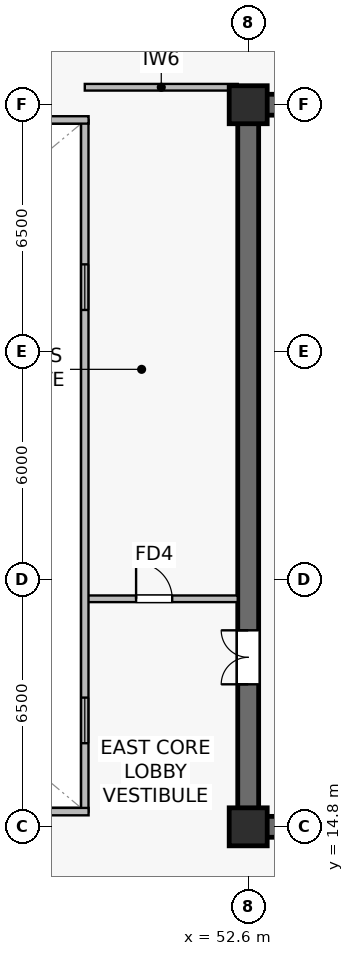
"""IFC4 building model, lengths in metres.
Left out: names, types, materials, properties, quantities, classifications, styles, units other than length and angle.
Written with IfcOpenShell. Run it as: python <this file> out.ifc"""

import sys

from ifc_helpers import new_model, si_unit, direction, frame, frame_2d, origin, origin_2d, place, context, subcontext, project, spatial, rectangle, extrude, source, transform, mapped, element, fill, save


model = new_model("IFC4")
c1 = context("Model", 3, precision=1e-05, world=origin(), true_north=direction((0.0, 1.0)))
c2 = subcontext(c1, "Body", "Model", "MODEL_VIEW")
j1 = project(units=[si_unit("LENGTHUNIT", "METRE"), si_unit("PLANEANGLEUNIT", "RADIAN")], contexts=[c1])
p1 = place(None, origin())
s1 = spatial("IfcSite", under=j1, at=p1, CompositionType="ELEMENT")
p2 = place(p1, origin())
s2 = spatial("IfcBuilding", under=s1, at=p2, CompositionType="ELEMENT")
p3 = place(p2, frame((0.0, 0.0, 238.3)))
s3 = spatial("IfcBuildingStorey", under=s2, at=p3, CompositionType="ELEMENT", Elevation=238.3)
p4 = place(p3, frame((52.325, 14.8, 0.0), z_axis=(0.0, 0.0, 1.0), x_axis=(1.0, 0.0, 0.0)))
e1 = element("IfcWall", 1, at=p4, inside=s3, PredefinedType="SHEAR", context=c2, shape_type="SweptSolid", body=[
    extrude(rectangle(XDim=15.35, YDim=0.55, at=frame_2d((7.675, 0.0))), origin(), (0.0, 0.0, 1.0), 3.8),
])
p5 = place(p3, frame((52.325, 33.8, 0.0), z_axis=(0.0, 0.0, 1.0), x_axis=(1.0, 0.0, 0.0)))
e2 = element("IfcWall", 2, at=p5, inside=s3, PredefinedType="SHEAR", context=c2, shape_type="SweptSolid", body=[
    extrude(rectangle(XDim=15.35, YDim=0.55, at=frame_2d((7.675, 0.0))), origin(), (0.0, 0.0, 1.0), 3.8),
])
p6 = place(p5, frame((8.775, 0.0, 0.0)))
e3 = element("IfcOpeningElement", 3, at=p6, cuts=e2, PredefinedType="OPENING", context=c2, shape_type="SweptSolid", body=[
    extrude(rectangle(XDim=0.95, YDim=2.15, at=frame_2d((0.475, 1.075))), frame((0.0, 0.285, 0.0), z_axis=(0.0, -1.0, 0.0), x_axis=(1.0, 0.0, 0.0)), (0.0, 0.0, 1.0), 0.57),
])
p7 = place(p5, frame((5.41, 0.0, 0.0)))
e4 = element("IfcOpeningElement", 4, at=p7, cuts=e2, PredefinedType="OPENING", context=c2, shape_type="SweptSolid", body=[
    extrude(rectangle(XDim=0.95, YDim=2.15, at=frame_2d((0.475, 1.075))), frame((0.0, 0.285, 0.0), z_axis=(0.0, -1.0, 0.0), x_axis=(1.0, 0.0, 0.0)), (0.0, 0.0, 1.0), 0.57),
])
p8 = place(p5, frame((2.01, 0.0, 0.0)))
e5 = element("IfcOpeningElement", 5, at=p8, cuts=e2, PredefinedType="OPENING", context=c2, shape_type="SweptSolid", body=[
    extrude(rectangle(XDim=0.95, YDim=2.15, at=frame_2d((0.475, 1.075))), frame((0.0, 0.285, 0.0), z_axis=(0.0, -1.0, 0.0), x_axis=(1.0, 0.0, 0.0)), (0.0, 0.0, 1.0), 0.57),
])
p9 = place(p3, frame((52.6, 15.075, 0.0), z_axis=(0.0, 0.0, 1.0), x_axis=(0.0, 1.0, 0.0)))
e6 = element("IfcWall", 6, at=p9, inside=s3, PredefinedType="SHEAR", context=c2, shape_type="SweptSolid", body=[
    extrude(rectangle(XDim=18.45, YDim=0.55, at=frame_2d((9.225, 0.0))), origin(), (0.0, 0.0, 1.0), 3.8),
])
p10 = place(p9, frame((3.475, 0.0, 0.0)))
e7 = element("IfcOpeningElement", 7, at=p10, cuts=e6, PredefinedType="OPENING", context=c2, shape_type="SweptSolid", body=[
    extrude(rectangle(XDim=1.42, YDim=2.2, at=frame_2d((0.71, 1.1))), frame((0.0, 0.285, 0.0), z_axis=(0.0, -1.0, 0.0), x_axis=(1.0, 0.0, 0.0)), (0.0, 0.0, 1.0), 0.57),
])
m1 = source(origin(), c2, "Body", "SweptSolid", [
    extrude(rectangle(XDim=1.0, YDim=1.0, at=origin_2d()), origin(), (0.0, 0.0, 1.0), 4.1),
])
for number, where, z_axis, x_axis in (
    (8, (52.6, 14.8, 0.0), (0.0, 0.0, 1.0), (1.0, 0.0, 0.0)),
    (9, (52.6, 33.8, 0.0), (0.0, 0.0, 1.0), (1.0, 0.0, 0.0)),
):
    element("IfcColumn", number, at=place(p3, frame(where, z_axis=z_axis, x_axis=x_axis)), inside=s3, PredefinedType="COLUMN", context=c2, shape_type="MappedRepresentation", body=[
        mapped(m1, transform((0.0, 0.0, 0.0), scale=1.0)),
    ])
p11 = place(p3, frame((48.3, 34.26, 0.0), z_axis=(0.0, 0.0, 1.0), x_axis=(1.0, 0.0, 0.0)))
e10 = element("IfcWall", 10, at=p11, inside=s3, PredefinedType="PARTITIONING", context=c2, shape_type="SweptSolid", body=[
    extrude(rectangle(XDim=4.025, YDim=0.175, at=frame_2d((2.012, 0.0))), origin(), (0.0, 0.0, 1.0), 3.485),
])
p12 = place(p3, frame((48.3, 20.8, 0.0), z_axis=(0.0, 0.0, 1.0), x_axis=(1.0, 0.0, 0.0)))
e11 = element("IfcWall", 11, at=p12, inside=s3, PredefinedType="PARTITIONING", context=c2, shape_type="SweptSolid", body=[
    extrude(rectangle(XDim=4.025, YDim=0.175, at=frame_2d((2.012, 0.0))), origin(), (0.0, 0.0, 1.0), 3.8),
])
p13 = place(p12, frame((1.35, 0.0, 0.0)))
e12 = element("IfcOpeningElement", 12, at=p13, cuts=e11, PredefinedType="OPENING", context=c2, shape_type="SweptSolid", body=[
    extrude(rectangle(XDim=0.95, YDim=2.15, at=frame_2d((0.475, 1.075))), frame((0.0, 0.098, 0.0), z_axis=(0.0, -1.0, 0.0), x_axis=(1.0, 0.0, 0.0)), (0.0, 0.0, 1.0), 0.195),
])
p14 = place(p3, frame((48.3, 15.2, 0.0), z_axis=(0.0, 0.0, 1.0), x_axis=(0.0, 1.0, 0.0)))
e13 = element("IfcWall", 13, at=p14, inside=s3, PredefinedType="SOLIDWALL", context=c2, shape_type="SweptSolid", body=[
    extrude(rectangle(XDim=18.2, YDim=0.195, at=frame_2d((9.1, 0.0))), origin(), (0.0, 0.0, 1.0), 3.8),
])
p15 = place(p14, frame((1.8, 0.0, 0.9)))
e14 = element("IfcOpeningElement", 14, at=p15, cuts=e13, PredefinedType="OPENING", context=c2, shape_type="SweptSolid", body=[
    extrude(rectangle(XDim=1.2, YDim=1.35, at=frame_2d((0.6, 0.675))), frame((0.0, 0.107, 0.0), z_axis=(0.0, -1.0, 0.0), x_axis=(1.0, 0.0, 0.0)), (0.0, 0.0, 1.0), 0.215),
])
p16 = place(p14, frame((13.2, 0.0, 0.9)))
e15 = element("IfcOpeningElement", 15, at=p16, cuts=e13, PredefinedType="OPENING", context=c2, shape_type="SweptSolid", body=[
    extrude(rectangle(XDim=1.2, YDim=1.35, at=frame_2d((0.6, 0.675))), frame((0.0, 0.107, 0.0), z_axis=(0.0, -1.0, 0.0), x_axis=(1.0, 0.0, 0.0)), (0.0, 0.0, 1.0), 0.215),
])
for number, where, z_axis, x_axis in (
    (16, (26.4, 15.2, 0.0), (0.0, 0.0, 1.0), (1.0, 0.0, 0.0)),
    (17, (26.4, 33.4, 0.0), (0.0, 0.0, 1.0), (1.0, 0.0, 0.0)),
):
    element("IfcWall", number, at=place(p3, frame(where, z_axis=z_axis, x_axis=x_axis)), inside=s3, PredefinedType="SOLIDWALL", context=c2, shape_type="SweptSolid", body=[
        extrude(rectangle(XDim=22.0, YDim=0.195, at=frame_2d((11.0, 0.0))), origin(), (0.0, 0.0, 1.0), 3.8),
    ])
m2 = source(origin(), c2, "Body", "SweptSolid", [
    extrude(rectangle(XDim=1.2, YDim=1.35, at=frame_2d((0.6, 0.675))), frame((0.0, 0.03, 0.0), z_axis=(0.0, -1.0, 0.0), x_axis=(1.0, 0.0, 0.0)), (0.0, 0.0, 1.0), 0.06),
])
p17 = place(p15, origin())
e18 = element("IfcWindow", 18, at=p17, inside=s3, PartitioningType="SINGLE_PANEL", PredefinedType="WINDOW", context=c2, shape_type="MappedRepresentation", body=[
    mapped(m2, transform((0.0, 0.0, 0.0), scale=1.0)),
])
fill(e14, e18)
p18 = place(p16, origin())
e19 = element("IfcWindow", 19, at=p18, inside=s3, PartitioningType="SINGLE_PANEL", PredefinedType="WINDOW", context=c2, shape_type="MappedRepresentation", body=[
    mapped(m2, transform((0.0, 0.0, 0.0), scale=1.0)),
])
fill(e15, e19)
m3 = source(origin(), c2, "Body", "SweptSolid", [
    extrude(rectangle(XDim=1.42, YDim=2.2, at=frame_2d((0.71, 1.1))), frame((0.0, 0.025, 0.0), z_axis=(0.0, -1.0, 0.0), x_axis=(1.0, 0.0, 0.0)), (0.0, 0.0, 1.0), 0.05),
])
p19 = place(p10, origin())
e20 = element("IfcDoor", 20, at=p19, inside=s3, OperationType="DOUBLE_DOOR_SINGLE_SWING", PredefinedType="DOOR", context=c2, shape_type="MappedRepresentation", body=[
    mapped(m3, transform((0.0, 0.0, 0.0), scale=1.0)),
])
fill(e7, e20)
m4 = source(origin(), c2, "Body", "SweptSolid", [
    extrude(rectangle(XDim=0.95, YDim=2.15, at=frame_2d((0.475, 1.075))), frame((0.0, 0.025, 0.0), z_axis=(0.0, -1.0, 0.0), x_axis=(1.0, 0.0, 0.0)), (0.0, 0.0, 1.0), 0.05),
])
p20 = place(p13, origin())
e21 = element("IfcDoor", 21, at=p20, inside=s3, OperationType="SINGLE_SWING_LEFT", PredefinedType="DOOR", context=c2, shape_type="MappedRepresentation", body=[
    mapped(m4, transform((0.0, 0.0, 0.0), scale=1.0)),
])
fill(e12, e21)
save(model, sys.argv[1])
